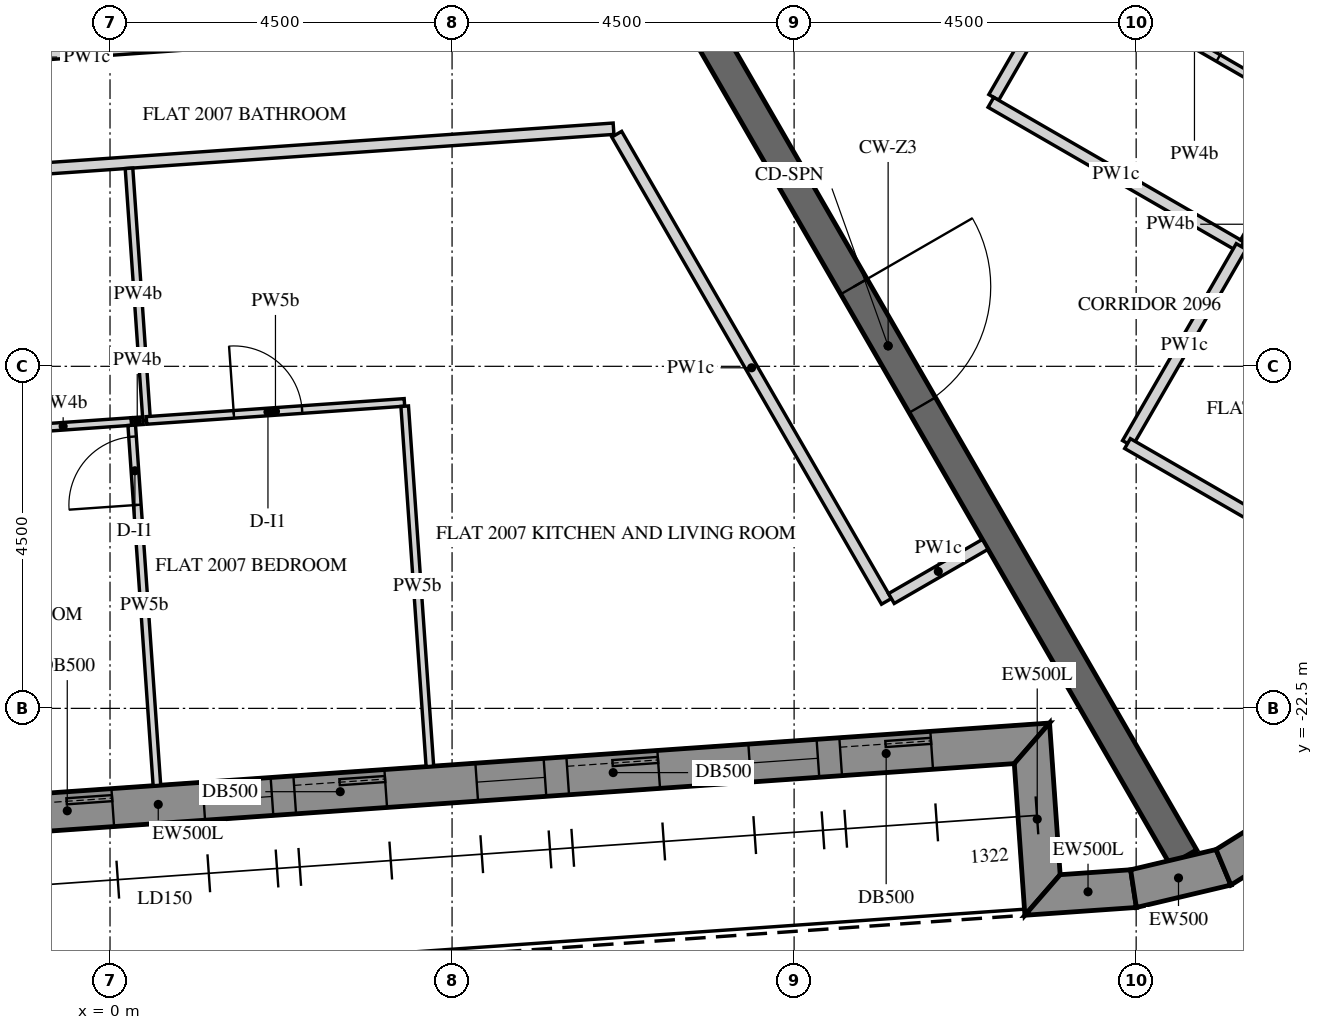
"""IFC4 building model, lengths in metres.
Left out: names, types, materials, properties, quantities, classifications, styles, units other than length and angle.
Written with IfcOpenShell. Run it as: python <this file> out.ifc"""

import sys

from ifc_helpers import new_model, si_unit, direction, frame, frame_2d, origin, place, context, subcontext, project, spatial, polyline, rectangle, outline, extrude, element, fill, save


model = new_model("IFC4")
c1 = context("Model", 3, precision=1e-05, world=origin(), true_north=direction((0.0, 1.0)))
c2 = subcontext(c1, "Body", "Model", "MODEL_VIEW")
j1 = project(units=[si_unit("LENGTHUNIT", "METRE"), si_unit("PLANEANGLEUNIT", "RADIAN")], contexts=[c1])
p1 = place(None, origin())
s1 = spatial("IfcSite", under=j1, at=p1, CompositionType="ELEMENT")
p2 = place(p1, origin())
s2 = spatial("IfcBuilding", under=s1, at=p2, CompositionType="ELEMENT")
p3 = place(p2, frame((0.0, 0.0, 260.1)))
s3 = spatial("IfcBuildingStorey", under=s2, at=p3, CompositionType="ELEMENT", Elevation=260.1)
p4 = place(p3, frame((-10.86, -24.567, -0.15), z_axis=(0.0, 0.0, 1.0), x_axis=(0.997564329317, 0.06975248292, 0.0)))
e1 = element("IfcWall", 1, at=p4, inside=s3, PredefinedType="SOLIDWALL", context=c2, shape_type="SweptSolid", body=[
    extrude(outline(polyline([(0.25, -0.25), (22.795, -0.25), (23.295, 0.25), (-0.25, 0.25), (0.25, -0.25)])), origin(), (0.0, 0.0, 1.0), 3.9),
])
p5 = place(p4, frame((1.323, 0.0, 1.05)))
e2 = element("IfcOpeningElement", 2, at=p5, cuts=e1, PredefinedType="OPENING", context=c2, shape_type="SweptSolid", body=[
    extrude(rectangle(XDim=0.9, YDim=1.5, at=frame_2d((0.45, 0.75))), frame((0.0, 0.26, 0.0), z_axis=(0.0, -1.0, 0.0), x_axis=(1.0, 0.0, 0.0)), (0.0, 0.0, 1.0), 0.52),
])
p6 = place(p4, frame((2.522, 0.0, 0.15)))
e3 = element("IfcOpeningElement", 3, at=p6, cuts=e1, PredefinedType="OPENING", context=c2, shape_type="SweptSolid", body=[
    extrude(rectangle(XDim=1.2, YDim=2.4, at=frame_2d((0.6, 1.2))), frame((0.0, 0.26, 0.0), z_axis=(0.0, -1.0, 0.0), x_axis=(1.0, 0.0, 0.0)), (0.0, 0.0, 1.0), 0.52),
])
p7 = place(p4, frame((4.922, 0.0, 1.05)))
e4 = element("IfcOpeningElement", 4, at=p7, cuts=e1, PredefinedType="OPENING", context=c2, shape_type="SweptSolid", body=[
    extrude(rectangle(XDim=0.9, YDim=1.5, at=frame_2d((0.45, 0.75))), frame((0.0, 0.26, 0.0), z_axis=(0.0, -1.0, 0.0), x_axis=(1.0, 0.0, 0.0)), (0.0, 0.0, 1.0), 0.52),
])
p8 = place(p4, frame((6.122, 0.0, 0.15)))
e5 = element("IfcOpeningElement", 5, at=p8, cuts=e1, PredefinedType="OPENING", context=c2, shape_type="SweptSolid", body=[
    extrude(rectangle(XDim=1.2, YDim=2.4, at=frame_2d((0.6, 1.2))), frame((0.0, 0.26, 0.0), z_axis=(0.0, -1.0, 0.0), x_axis=(1.0, 0.0, 0.0)), (0.0, 0.0, 1.0), 0.52),
])
p9 = place(p4, frame((8.522, 0.0, 1.05)))
e6 = element("IfcOpeningElement", 6, at=p9, cuts=e1, PredefinedType="OPENING", context=c2, shape_type="SweptSolid", body=[
    extrude(rectangle(XDim=0.9, YDim=1.5, at=frame_2d((0.45, 0.75))), frame((0.0, 0.26, 0.0), z_axis=(0.0, -1.0, 0.0), x_axis=(1.0, 0.0, 0.0)), (0.0, 0.0, 1.0), 0.52),
])
p10 = place(p4, frame((9.722, 0.0, 0.15)))
e7 = element("IfcOpeningElement", 7, at=p10, cuts=e1, PredefinedType="OPENING", context=c2, shape_type="SweptSolid", body=[
    extrude(rectangle(XDim=1.2, YDim=2.4, at=frame_2d((0.6, 1.2))), frame((0.0, 0.26, 0.0), z_axis=(0.0, -1.0, 0.0), x_axis=(1.0, 0.0, 0.0)), (0.0, 0.0, 1.0), 0.52),
])
p11 = place(p4, frame((12.122, 0.0, 1.05)))
e8 = element("IfcOpeningElement", 8, at=p11, cuts=e1, PredefinedType="OPENING", context=c2, shape_type="SweptSolid", body=[
    extrude(rectangle(XDim=0.9, YDim=1.5, at=frame_2d((0.45, 0.75))), frame((0.0, 0.26, 0.0), z_axis=(0.0, -1.0, 0.0), x_axis=(1.0, 0.0, 0.0)), (0.0, 0.0, 1.0), 0.52),
])
p12 = place(p4, frame((13.323, 0.0, 0.15)))
e9 = element("IfcOpeningElement", 9, at=p12, cuts=e1, PredefinedType="OPENING", context=c2, shape_type="SweptSolid", body=[
    extrude(rectangle(XDim=1.2, YDim=2.4, at=frame_2d((0.6, 1.2))), frame((0.0, 0.26, 0.0), z_axis=(0.0, -1.0, 0.0), x_axis=(1.0, 0.0, 0.0)), (0.0, 0.0, 1.0), 0.52),
])
p13 = place(p4, frame((15.722, 0.0, 1.05)))
e10 = element("IfcOpeningElement", 10, at=p13, cuts=e1, PredefinedType="OPENING", context=c2, shape_type="SweptSolid", body=[
    extrude(rectangle(XDim=0.9, YDim=1.5, at=frame_2d((0.45, 0.75))), frame((0.0, 0.26, 0.0), z_axis=(0.0, -1.0, 0.0), x_axis=(1.0, 0.0, 0.0)), (0.0, 0.0, 1.0), 0.52),
])
p14 = place(p4, frame((16.922, 0.0, 0.15)))
e11 = element("IfcOpeningElement", 11, at=p14, cuts=e1, PredefinedType="OPENING", context=c2, shape_type="SweptSolid", body=[
    extrude(rectangle(XDim=1.2, YDim=2.4, at=frame_2d((0.6, 1.2))), frame((0.0, 0.26, 0.0), z_axis=(0.0, -1.0, 0.0), x_axis=(1.0, 0.0, 0.0)), (0.0, 0.0, 1.0), 0.52),
])
p15 = place(p4, frame((19.323, 0.0, 1.05)))
e12 = element("IfcOpeningElement", 12, at=p15, cuts=e1, PredefinedType="OPENING", context=c2, shape_type="SweptSolid", body=[
    extrude(rectangle(XDim=0.9, YDim=1.5, at=frame_2d((0.45, 0.75))), frame((0.0, 0.26, 0.0), z_axis=(0.0, -1.0, 0.0), x_axis=(1.0, 0.0, 0.0)), (0.0, 0.0, 1.0), 0.52),
])
p16 = place(p4, frame((20.522, 0.0, 0.15)))
e13 = element("IfcOpeningElement", 13, at=p16, cuts=e1, PredefinedType="OPENING", context=c2, shape_type="SweptSolid", body=[
    extrude(rectangle(XDim=1.2, YDim=2.4, at=frame_2d((0.6, 1.2))), frame((0.0, 0.26, 0.0), z_axis=(0.0, -1.0, 0.0), x_axis=(1.0, 0.0, 0.0)), (0.0, 0.0, 1.0), 0.52),
])
p17 = place(p3, frame((12.129, -22.96, -0.15), z_axis=(0.0, 0.0, 1.0), x_axis=(0.069824268692, -0.99755930726, 0.0)))
e14 = element("IfcWall", 14, at=p17, inside=s3, PredefinedType="SOLIDWALL", context=c2, shape_type="SweptSolid", body=[
    extrude(outline(polyline([(0.25, -0.25), (2.25, -0.25), (1.75, 0.25), (-0.25, 0.25), (0.25, -0.25)])), origin(), (0.0, 0.0, 1.0), 3.9),
])
p18 = place(p3, frame((12.268, -24.955, -0.15), z_axis=(0.0, 0.0, 1.0), x_axis=(0.997561942506, 0.06978660948, 0.0)))
e15 = element("IfcWall", 15, at=p18, inside=s3, PredefinedType="SOLIDWALL", context=c2, shape_type="SweptSolid", body=[
    extrude(outline(polyline([(-0.25, -0.25), (1.22, -0.25), (1.179, 0.25), (0.25, 0.25), (-0.25, -0.25)])), origin(), (0.0, 0.0, 1.0), 3.9),
])
p19 = place(p3, frame((13.465, -24.871, -0.15), z_axis=(0.0, 0.0, 1.0), x_axis=(0.973044740285, 0.230616420501, 0.0)))
e16 = element("IfcWall", 16, at=p19, inside=s3, PredefinedType="SOLIDWALL", context=c2, shape_type="SweptSolid", body=[
    extrude(outline(polyline([(-0.021, -0.25), (1.257, -0.25), (1.175, 0.25), (0.021, 0.25), (-0.021, -0.25)])), origin(), (0.0, 0.0, 1.0), 3.9),
])
p20 = place(p3, frame((14.649, -24.591, -0.15), z_axis=(0.0, 0.0, 1.0), x_axis=(0.848054682072, 0.529908724419, 0.0)))
e17 = element("IfcWall", 17, at=p20, inside=s3, PredefinedType="SOLIDWALL", context=c2, shape_type="SweptSolid", body=[
    extrude(outline(polyline([(-0.041, -0.25), (1.257, -0.25), (1.175, 0.25), (0.041, 0.25), (-0.041, -0.25)])), origin(), (0.0, 0.0, 1.0), 3.9),
])
p21 = place(p3, frame((6.351, -11.0, -0.15), z_axis=(0.0, 0.0, 1.0), x_axis=(0.499998894578, -0.866026041999, 0.0)))
e18 = element("IfcWall", 18, at=p21, inside=s3, PredefinedType="SHEAR", context=c2, shape_type="SweptSolid", body=[
    extrude(rectangle(XDim=15.544, YDim=0.4, at=frame_2d((7.772, 0.0))), origin(), (0.0, 0.0, 1.0), 3.9),
])
p22 = place(p21, frame((6.872, 0.0, 0.15)))
e19 = element("IfcOpeningElement", 19, at=p22, cuts=e18, PredefinedType="OPENING", context=c2, shape_type="SweptSolid", body=[
    extrude(rectangle(XDim=1.8, YDim=2.4, at=frame_2d((0.9, 1.2))), frame((0.0, 0.21, 0.0), z_axis=(0.0, -1.0, 0.0), x_axis=(1.0, 0.0, 0.0)), (0.0, 0.0, 1.0), 0.42),
])
p23 = place(p3, frame((-10.606, -16.079, 0.0), z_axis=(0.0, 0.0, 1.0), x_axis=(0.997563356349, 0.069766396426, 0.0)))
e20 = element("IfcWall", 20, at=p23, inside=s3, PredefinedType="PARTITIONING", context=c2, shape_type="SweptSolid", body=[
    extrude(rectangle(XDim=17.273, YDim=0.15, at=frame_2d((8.636, 0.0))), origin(), (0.0, 0.0, 1.0), 2.823),
])
p24 = place(p23, frame((7.478, 0.0, 0.0)))
e21 = element("IfcOpeningElement", 21, at=p24, cuts=e20, PredefinedType="OPENING", context=c2, shape_type="SweptSolid", body=[
    extrude(rectangle(XDim=1.0, YDim=2.1, at=frame_2d((0.5, 1.05))), frame((0.0, 0.085, 0.0), z_axis=(0.0, -1.0, 0.0), x_axis=(1.0, 0.0, 0.0)), (0.0, 0.0, 1.0), 0.17),
])
p25 = place(p3, frame((6.666, -14.946, 0.0), z_axis=(0.0, 0.0, 1.0), x_axis=(0.499979539361, -0.866037216418, 0.0)))
e22 = element("IfcWall", 22, at=p25, inside=s3, PredefinedType="PARTITIONING", context=c2, shape_type="SweptSolid", body=[
    extrude(rectangle(XDim=7.097, YDim=0.15, at=frame_2d((3.548, 0.0))), origin(), (0.0, 0.0, 1.0), 2.823),
])
p26 = place(p3, frame((10.28, -21.055, 0.0), z_axis=(0.0, 0.0, 1.0), x_axis=(0.866020080793, 0.500009219579, 0.0)))
e23 = element("IfcWall", 23, at=p26, inside=s3, PredefinedType="PARTITIONING", context=c2, shape_type="SweptSolid", body=[
    extrude(rectangle(XDim=1.425, YDim=0.15, at=frame_2d((0.712, 0.0))), origin(), (0.0, 0.0, 1.0), 2.823),
])
p27 = place(p3, frame((7.051, -13.341, 0.0), z_axis=(0.0, 0.0, 1.0), x_axis=(-0.997563599815, -0.069762915103, 0.0)))
e24 = element("IfcWall", 24, at=p27, inside=s3, PredefinedType="PARTITIONING", context=c2, shape_type="SweptSolid", body=[
    extrude(rectangle(XDim=16.952, YDim=0.15, at=frame_2d((8.476, 0.0))), origin(), (0.0, 0.0, 1.0), 2.823),
])
p28 = place(p27, frame((8.026, 0.0, 0.0)))
e25 = element("IfcOpeningElement", 25, at=p28, cuts=e24, PredefinedType="OPENING", context=c2, shape_type="SweptSolid", body=[
    extrude(rectangle(XDim=0.9, YDim=2.1, at=frame_2d((0.45, 1.05))), frame((0.0, 0.085, 0.0), z_axis=(0.0, -1.0, 0.0), x_axis=(1.0, 0.0, 0.0)), (0.0, 0.0, 1.0), 0.17),
])
p29 = place(p3, frame((11.627, -14.462, 0.0), z_axis=(0.0, 0.0, 1.0), x_axis=(0.499994634027, 0.866028501808, 0.0)))
e26 = element("IfcWall", 26, at=p29, inside=s3, PredefinedType="PARTITIONING", context=c2, shape_type="SweptSolid", body=[
    extrude(rectangle(XDim=15.296, YDim=0.15, at=frame_2d((7.648, 0.0))), origin(), (0.0, 0.0, 1.0), 2.823),
])
p30 = place(p29, frame((2.725, 0.0, 0.0)))
e27 = element("IfcOpeningElement", 27, at=p30, cuts=e26, PredefinedType="OPENING", context=c2, shape_type="SweptSolid", body=[
    extrude(rectangle(XDim=1.0, YDim=2.1, at=frame_2d((0.5, 1.05))), frame((0.0, 0.085, 0.0), z_axis=(0.0, -1.0, 0.0), x_axis=(1.0, 0.0, 0.0)), (0.0, 0.0, 1.0), 0.17),
])
p31 = place(p29, frame((13.936, 0.0, 0.0)))
e28 = element("IfcOpeningElement", 28, at=p31, cuts=e26, PredefinedType="OPENING", context=c2, shape_type="SweptSolid", body=[
    extrude(rectangle(XDim=1.0, YDim=2.1, at=frame_2d((0.5, 1.05))), frame((0.0, 0.085, 0.0), z_axis=(0.0, -1.0, 0.0), x_axis=(1.0, 0.0, 0.0)), (0.0, 0.0, 1.0), 0.17),
])
p32 = place(p3, frame((14.88, -16.427, 0.0), z_axis=(0.0, 0.0, 1.0), x_axis=(-0.86601654697, 0.500015340139, 0.0)))
e29 = element("IfcWall", 29, at=p32, inside=s3, PredefinedType="PARTITIONING", context=c2, shape_type="SweptSolid", body=[
    extrude(rectangle(XDim=3.8, YDim=0.15, at=frame_2d((1.9, 0.0))), origin(), (0.0, 0.0, 1.0), 2.823),
])
p33 = place(p3, frame((13.386, -19.014, 0.0), z_axis=(0.0, 0.0, 1.0), x_axis=(0.500009728207, 0.866019787128, 0.0)))
e30 = element("IfcWall", 30, at=p33, inside=s3, PredefinedType="PARTITIONING", context=c2, shape_type="SweptSolid", body=[
    extrude(rectangle(XDim=2.992, YDim=0.15, at=frame_2d((1.496, 0.0))), origin(), (0.0, 0.0, 1.0), 2.823),
])
p34 = place(p3, frame((17.196, -21.216, 0.0), z_axis=(0.0, 0.0, 1.0), x_axis=(-0.866010893236, 0.500025132165, 0.0)))
e31 = element("IfcWall", 31, at=p34, inside=s3, PredefinedType="PARTITIONING", context=c2, shape_type="SweptSolid", body=[
    extrude(rectangle(XDim=4.399, YDim=0.15, at=frame_2d((2.199, 0.0))), origin(), (0.0, 0.0, 1.0), 2.823),
])
p35 = place(p3, frame((0.25, -15.395, 0.0), z_axis=(0.0, 0.0, 1.0), x_axis=(0.069754598287, -0.997564181403, 0.0)))
e32 = element("IfcWall", 32, at=p35, inside=s3, PredefinedType="PARTITIONING", context=c2, shape_type="SweptSolid", body=[
    extrude(rectangle(XDim=3.325, YDim=0.1, at=frame_2d((1.663, 0.0))), origin(), (0.0, 0.0, 1.0), 2.823),
])
p36 = place(p3, frame((0.48, -18.712, 0.0), z_axis=(0.0, 0.0, 1.0), x_axis=(0.997564312984, 0.069752716511, 0.0)))
e33 = element("IfcWall", 33, at=p36, inside=s3, PredefinedType="PARTITIONING", context=c2, shape_type="SweptSolid", body=[
    extrude(rectangle(XDim=3.402, YDim=0.1, at=frame_2d((1.701, 0.0))), origin(), (0.0, 0.0, 1.0), 2.823),
])
p37 = place(p36, frame((1.152, 0.0, 0.0)))
e34 = element("IfcOpeningElement", 34, at=p37, cuts=e33, PredefinedType="OPENING", context=c2, shape_type="SweptSolid", body=[
    extrude(rectangle(XDim=0.9, YDim=2.1, at=frame_2d((0.45, 1.05))), frame((0.0, 0.06, 0.0), z_axis=(0.0, -1.0, 0.0), x_axis=(1.0, 0.0, 0.0)), (0.0, 0.0, 1.0), 0.12),
])
p38 = place(p3, frame((3.877, -18.525, 0.0), z_axis=(0.0, 0.0, 1.0), x_axis=(0.069745758817, -0.997564799463, 0.0)))
e35 = element("IfcWall", 35, at=p38, inside=s3, PredefinedType="PARTITIONING", context=c2, shape_type="SweptSolid", body=[
    extrude(rectangle(XDim=4.75, YDim=0.1, at=frame_2d((2.375, 0.0))), origin(), (0.0, 0.0, 1.0), 2.823),
])
p39 = place(p3, frame((-1.515, -18.852, 0.0), z_axis=(0.0, 0.0, 1.0), x_axis=(0.997562835018, 0.069773850337, 0.0)))
e36 = element("IfcWall", 36, at=p39, inside=s3, PredefinedType="PARTITIONING", context=c2, shape_type="SweptSolid", body=[
    extrude(rectangle(XDim=1.802, YDim=0.1, at=frame_2d((0.901, 0.0))), origin(), (0.0, 0.0, 1.0), 2.823),
])
p40 = place(p3, frame((0.282, -18.726, 0.0), z_axis=(0.0, 0.0, 1.0), x_axis=(0.997611278984, 0.069077753617, 0.0)))
e37 = element("IfcWall", 37, at=p40, inside=s3, PredefinedType="PARTITIONING", context=c2, shape_type="SweptSolid", body=[
    extrude(rectangle(XDim=0.152, YDim=0.1, at=frame_2d((0.076, 0.0))), origin(), (0.0, 0.0, 1.0), 2.823),
])
p41 = place(p3, frame((0.617, -23.514, 0.0), z_axis=(0.0, 0.0, 1.0), x_axis=(-0.069749334994, 0.997564549424, 0.0)))
e38 = element("IfcWall", 38, at=p41, inside=s3, PredefinedType="PARTITIONING", context=c2, shape_type="SweptSolid", body=[
    extrude(rectangle(XDim=4.75, YDim=0.1, at=frame_2d((2.375, 0.0))), origin(), (0.0, 0.0, 1.0), 2.823),
])
p42 = place(p41, frame((3.7, 0.0, 0.0)))
e39 = element("IfcOpeningElement", 39, at=p42, cuts=e38, PredefinedType="OPENING", context=c2, shape_type="SweptSolid", body=[
    extrude(rectangle(XDim=0.9, YDim=2.1, at=frame_2d((0.45, 1.05))), frame((0.0, 0.06, 0.0), z_axis=(0.0, -1.0, 0.0), x_axis=(1.0, 0.0, 0.0)), (0.0, 0.0, 1.0), 0.12),
])
p43 = place(p3, frame((12.654, -12.833, 0.0), z_axis=(0.0, 0.0, 1.0), x_axis=(0.866056803351, -0.499945610411, 0.0)))
e40 = element("IfcWall", 40, at=p43, inside=s3, PredefinedType="PARTITIONING", context=c2, shape_type="SweptSolid", body=[
    extrude(rectangle(XDim=3.725, YDim=0.1, at=frame_2d((1.863, 0.0))), origin(), (0.0, 0.0, 1.0), 2.823),
])
p44 = place(p43, frame((1.425, 0.0, 0.0)))
e41 = element("IfcOpeningElement", 41, at=p44, cuts=e40, PredefinedType="OPENING", context=c2, shape_type="SweptSolid", body=[
    extrude(rectangle(XDim=0.8, YDim=2.1, at=frame_2d((0.4, 1.05))), frame((0.0, 0.06, 0.0), z_axis=(0.0, -1.0, 0.0), x_axis=(1.0, 0.0, 0.0)), (0.0, 0.0, 1.0), 0.12),
])
p45 = place(p3, frame((14.917, -16.364, 0.0), z_axis=(0.0, 0.0, 1.0), x_axis=(0.500141487433, 0.865943700565, 0.0)))
e42 = element("IfcWall", 42, at=p45, inside=s3, PredefinedType="PARTITIONING", context=c2, shape_type="SweptSolid", body=[
    extrude(rectangle(XDim=0.538, YDim=0.1, at=frame_2d((0.269, 0.0))), origin(), (0.0, 0.0, 1.0), 2.823),
])
p46 = place(p10, frame((0.0, 0.175, 0.0)))
e43 = element("IfcDoor", 43, at=p46, inside=s3, OperationType="SLIDING_TO_LEFT", PredefinedType="DOOR", context=c2, shape_type="SweptSolid", body=[
    extrude(rectangle(XDim=1.2, YDim=2.4, at=frame_2d((0.6, 1.2))), frame((0.0, 0.025, 0.0), z_axis=(0.0, -1.0, 0.0), x_axis=(1.0, 0.0, 0.0)), (0.0, 0.0, 1.0), 0.05),
])
fill(e7, e43)
p47 = place(p11, frame((0.0, 0.18, 0.0)))
e44 = element("IfcWindow", 44, at=p47, inside=s3, PartitioningType="SINGLE_PANEL", PredefinedType="WINDOW", context=c2, shape_type="SweptSolid", body=[
    extrude(rectangle(XDim=0.9, YDim=1.5, at=frame_2d((0.45, 0.75))), frame((0.0, 0.03, 0.0), z_axis=(0.0, -1.0, 0.0), x_axis=(1.0, 0.0, 0.0)), (0.0, 0.0, 1.0), 0.06),
])
fill(e8, e44)
p48 = place(p12, frame((0.0, 0.175, 0.0)))
e45 = element("IfcDoor", 45, at=p48, inside=s3, OperationType="SLIDING_TO_LEFT", PredefinedType="DOOR", context=c2, shape_type="SweptSolid", body=[
    extrude(rectangle(XDim=1.2, YDim=2.4, at=frame_2d((0.6, 1.2))), frame((0.0, 0.025, 0.0), z_axis=(0.0, -1.0, 0.0), x_axis=(1.0, 0.0, 0.0)), (0.0, 0.0, 1.0), 0.05),
])
fill(e9, e45)
p49 = place(p13, frame((0.0, 0.18, 0.0)))
e46 = element("IfcWindow", 46, at=p49, inside=s3, PartitioningType="SINGLE_PANEL", PredefinedType="WINDOW", context=c2, shape_type="SweptSolid", body=[
    extrude(rectangle(XDim=0.9, YDim=1.5, at=frame_2d((0.45, 0.75))), frame((0.0, 0.03, 0.0), z_axis=(0.0, -1.0, 0.0), x_axis=(1.0, 0.0, 0.0)), (0.0, 0.0, 1.0), 0.06),
])
fill(e10, e46)
p50 = place(p14, frame((0.0, 0.175, 0.0)))
e47 = element("IfcDoor", 47, at=p50, inside=s3, OperationType="SLIDING_TO_LEFT", PredefinedType="DOOR", context=c2, shape_type="SweptSolid", body=[
    extrude(rectangle(XDim=1.2, YDim=2.4, at=frame_2d((0.6, 1.2))), frame((0.0, 0.025, 0.0), z_axis=(0.0, -1.0, 0.0), x_axis=(1.0, 0.0, 0.0)), (0.0, 0.0, 1.0), 0.05),
])
fill(e11, e47)
p51 = place(p15, frame((0.0, 0.18, 0.0)))
e48 = element("IfcWindow", 48, at=p51, inside=s3, PartitioningType="SINGLE_PANEL", PredefinedType="WINDOW", context=c2, shape_type="SweptSolid", body=[
    extrude(rectangle(XDim=0.9, YDim=1.5, at=frame_2d((0.45, 0.75))), frame((0.0, 0.03, 0.0), z_axis=(0.0, -1.0, 0.0), x_axis=(1.0, 0.0, 0.0)), (0.0, 0.0, 1.0), 0.06),
])
fill(e12, e48)
p52 = place(p16, frame((0.0, 0.175, 0.0)))
e49 = element("IfcDoor", 49, at=p52, inside=s3, OperationType="SLIDING_TO_LEFT", PredefinedType="DOOR", context=c2, shape_type="SweptSolid", body=[
    extrude(rectangle(XDim=1.2, YDim=2.4, at=frame_2d((0.6, 1.2))), frame((0.0, 0.025, 0.0), z_axis=(0.0, -1.0, 0.0), x_axis=(1.0, 0.0, 0.0)), (0.0, 0.0, 1.0), 0.05),
])
fill(e13, e49)
p53 = place(p22, origin())
e50 = element("IfcDoor", 50, at=p53, inside=s3, OperationType="DOUBLE_DOOR_SINGLE_SWING", PredefinedType="DOOR", context=c2, shape_type="SweptSolid", body=[
    extrude(rectangle(XDim=1.8, YDim=2.4, at=frame_2d((0.9, 1.2))), frame((0.0, 0.025, 0.0), z_axis=(0.0, -1.0, 0.0), x_axis=(1.0, 0.0, 0.0)), (0.0, 0.0, 1.0), 0.05),
])
fill(e19, e50)
p54 = place(p42, origin())
e51 = element("IfcDoor", 51, at=p54, inside=s3, OperationType="SINGLE_SWING_RIGHT", PredefinedType="DOOR", context=c2, shape_type="SweptSolid", body=[
    extrude(rectangle(XDim=0.9, YDim=2.1, at=frame_2d((0.45, 1.05))), frame((0.0, 0.025, 0.0), z_axis=(0.0, -1.0, 0.0), x_axis=(1.0, 0.0, 0.0)), (0.0, 0.0, 1.0), 0.05),
])
fill(e39, e51)
p55 = place(p37, origin())
e52 = element("IfcDoor", 52, at=p55, inside=s3, OperationType="SINGLE_SWING_RIGHT", PredefinedType="DOOR", context=c2, shape_type="SweptSolid", body=[
    extrude(rectangle(XDim=0.9, YDim=2.1, at=frame_2d((0.45, 1.05))), frame((0.0, 0.025, 0.0), z_axis=(0.0, -1.0, 0.0), x_axis=(1.0, 0.0, 0.0)), (0.0, 0.0, 1.0), 0.05),
])
fill(e34, e52)
p56 = place(p44, origin())
e53 = element("IfcDoor", 53, at=p56, inside=s3, OperationType="SINGLE_SWING_RIGHT", PredefinedType="DOOR", context=c2, shape_type="SweptSolid", body=[
    extrude(rectangle(XDim=0.8, YDim=2.1, at=frame_2d((0.4, 1.05))), frame((0.0, 0.025, 0.0), z_axis=(0.0, -1.0, 0.0), x_axis=(1.0, 0.0, 0.0)), (0.0, 0.0, 1.0), 0.05),
])
fill(e41, e53)
save(model, sys.argv[1])
